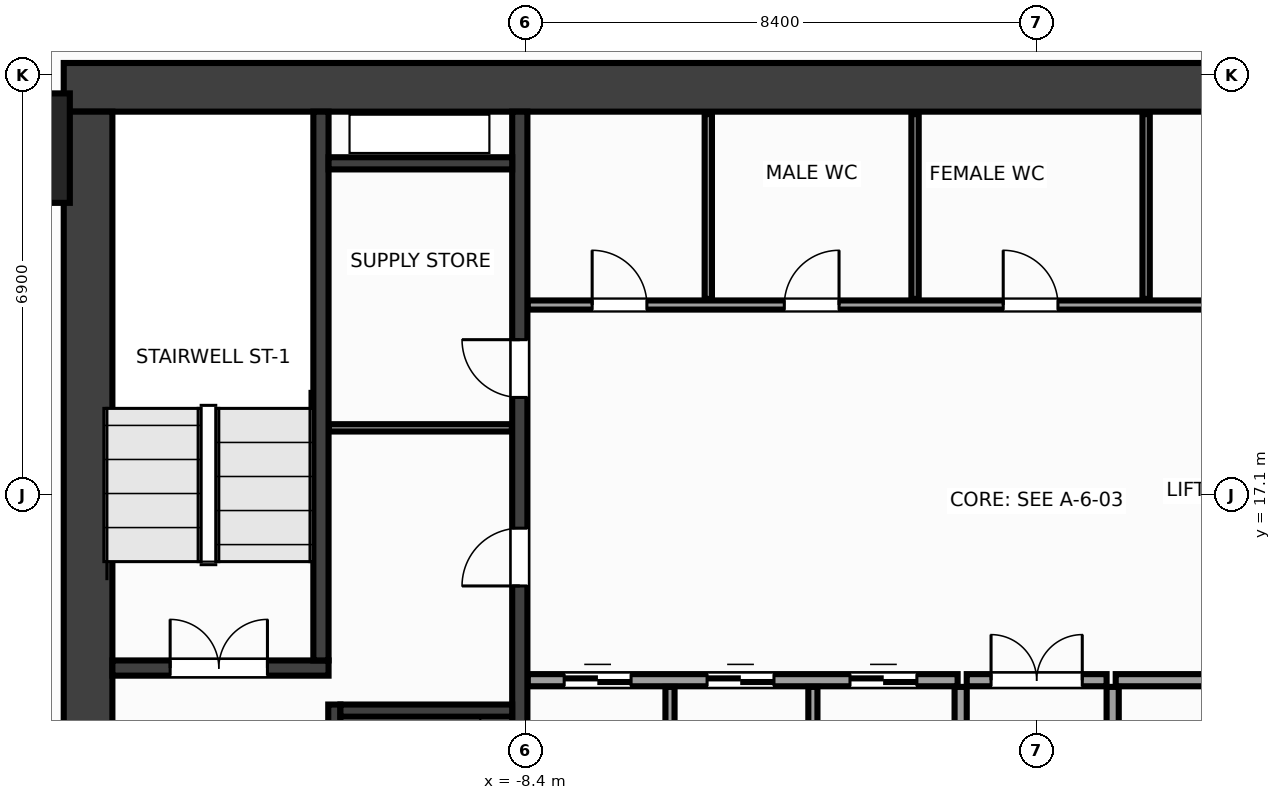
"""IFC4 building model, lengths in metres.
Left out: names, types, materials, properties, quantities, classifications, styles, units other than length and angle.
Written with IfcOpenShell. Run it as: python <this file> out.ifc"""

import sys

from ifc_helpers import new_model, si_unit, direction, frame, frame_2d, origin, origin_2d, place, context, subcontext, project, spatial, rectangle, extrude, source, transform, mapped, element, fill, save


model = new_model("IFC4")
c1 = context("Model", 3, precision=1e-05, world=origin(), true_north=direction((0.0, 1.0)))
c2 = subcontext(c1, "Body", "Model", "MODEL_VIEW")
j1 = project(units=[si_unit("LENGTHUNIT", "METRE"), si_unit("PLANEANGLEUNIT", "RADIAN")], contexts=[c1])
p1 = place(None, origin())
s1 = spatial("IfcSite", under=j1, at=p1, CompositionType="ELEMENT")
p2 = place(p1, origin())
s2 = spatial("IfcBuilding", under=s1, at=p2, CompositionType="ELEMENT")
p3 = place(p2, frame((0.0, 0.0, 38.0)))
s3 = spatial("IfcBuildingStorey", under=s2, at=p3, CompositionType="ELEMENT", Elevation=38.0)
m1 = source(origin(), c2, "Body", "SweptSolid", [
    extrude(rectangle(XDim=32.0, YDim=0.8, at=frame_2d((16.0, 0.0))), origin(), (0.0, 0.0, 1.0), 3.6),
])
p4 = place(p3, frame((-16.0, 23.8, 0.0), z_axis=(0.0, 0.0, 1.0), x_axis=(1.0, 0.0, 0.0)))
e1 = element("IfcWall", 1, at=p4, inside=s3, PredefinedType="SHEAR", context=c2, shape_type="MappedRepresentation", body=[
    mapped(m1, transform((0.0, 0.0, 0.0), x_axis=(1.0, 0.0, 0.0), y_axis=(0.0, 1.0, 0.0), z_axis=(0.0, 0.0, 1.0), scale=1.0)),
])
m2 = source(origin(), c2, "Body", "SweptSolid", [
    extrude(rectangle(XDim=12.8, YDim=0.8, at=frame_2d((6.4, 0.0))), origin(), (0.0, 0.0, 1.0), 3.6),
])
p5 = place(p3, frame((-15.6, 10.6, 0.0), z_axis=(0.0, 0.0, 1.0), x_axis=(0.0, 1.0, 0.0)))
e2 = element("IfcWall", 2, at=p5, inside=s3, PredefinedType="SHEAR", context=c2, shape_type="MappedRepresentation", body=[
    mapped(m2, transform((0.0, 0.0, 0.0), x_axis=(1.0, 0.0, 0.0), y_axis=(0.0, 1.0, 0.0), z_axis=(0.0, 0.0, 1.0), scale=1.0)),
])
m3 = source(origin(), c2, "Body", "SweptSolid", [
    extrude(rectangle(XDim=12.8, YDim=0.25, at=frame_2d((6.4, 0.0))), origin(), (0.0, 0.0, 1.0), 3.6),
])
p6 = place(p3, frame((-8.5, 10.6, 0.0), z_axis=(0.0, 0.0, 1.0), x_axis=(0.0, 1.0, 0.0)))
e3 = element("IfcWall", 3, at=p6, inside=s3, PredefinedType="SHEAR", context=c2, shape_type="MappedRepresentation", body=[
    mapped(m3, transform((0.0, 0.0, 0.0), x_axis=(1.0, 0.0, 0.0), y_axis=(0.0, 1.0, 0.0), z_axis=(0.0, 0.0, 1.0), scale=1.0)),
])
p7 = place(p6, frame((5.0, 0.0, 0.0)))
e4 = element("IfcOpeningElement", 4, at=p7, cuts=e3, PredefinedType="OPENING", context=c2, shape_type="SweptSolid", body=[
    extrude(rectangle(XDim=0.95, YDim=2.15, at=frame_2d((0.475, 1.075))), frame((0.0, 0.137, 0.0), z_axis=(0.0, -1.0, 0.0), x_axis=(1.0, 0.0, 0.0)), (0.0, 0.0, 1.0), 0.274),
])
p8 = place(p6, frame((8.1, 0.0, 0.0)))
e5 = element("IfcOpeningElement", 5, at=p8, cuts=e3, PredefinedType="OPENING", context=c2, shape_type="SweptSolid", body=[
    extrude(rectangle(XDim=0.95, YDim=2.15, at=frame_2d((0.475, 1.075))), frame((0.0, 0.137, 0.0), z_axis=(0.0, -1.0, 0.0), x_axis=(1.0, 0.0, 0.0)), (0.0, 0.0, 1.0), 0.274),
])
m4 = source(origin(), c2, "Body", "SweptSolid", [
    extrude(rectangle(XDim=3.555, YDim=0.25, at=frame_2d((1.777, 0.0))), origin(), (0.0, 0.0, 1.0), 3.6),
])
p9 = place(p3, frame((-15.2, 14.25, 0.0), z_axis=(0.0, 0.0, 1.0), x_axis=(1.0, 0.0, 0.0)))
e6 = element("IfcWall", 6, at=p9, inside=s3, PredefinedType="SHEAR", context=c2, shape_type="MappedRepresentation", body=[
    mapped(m4, transform((0.0, 0.0, 0.0), x_axis=(1.0, 0.0, 0.0), y_axis=(0.0, 1.0, 0.0), z_axis=(0.0, 0.0, 1.0), scale=1.0)),
])
p10 = place(p9, frame((0.95, 0.0, 0.0)))
e7 = element("IfcOpeningElement", 7, at=p10, cuts=e6, PredefinedType="OPENING", context=c2, shape_type="SweptSolid", body=[
    extrude(rectangle(XDim=1.6, YDim=2.15, at=frame_2d((0.8, 1.075))), frame((0.0, 0.137, 0.0), z_axis=(0.0, -1.0, 0.0), x_axis=(1.0, 0.0, 0.0)), (0.0, 0.0, 1.0), 0.274),
])
m5 = source(origin(), c2, "Body", "SweptSolid", [
    extrude(rectangle(XDim=9.025, YDim=0.25, at=frame_2d((4.512, 0.0))), origin(), (0.0, 0.0, 1.0), 3.6),
])
p11 = place(p3, frame((-11.77, 14.375, 0.0), z_axis=(0.0, 0.0, 1.0), x_axis=(0.0, 1.0, 0.0)))
e8 = element("IfcWall", 8, at=p11, inside=s3, PredefinedType="SHEAR", context=c2, shape_type="MappedRepresentation", body=[
    mapped(m5, transform((0.0, 0.0, 0.0), x_axis=(1.0, 0.0, 0.0), y_axis=(0.0, 1.0, 0.0), z_axis=(0.0, 0.0, 1.0), scale=1.0)),
])
m6 = source(origin(), c2, "Body", "SweptSolid", [
    extrude(rectangle(XDim=3.05, YDim=0.2, at=frame_2d((1.525, 0.0))), origin(), (0.0, 0.0, 1.0), 3.6),
])
p12 = place(p3, frame((-11.55, 10.6, 0.0), z_axis=(0.0, 0.0, 1.0), x_axis=(0.0, 1.0, 0.0)))
e9 = element("IfcWall", 9, at=p12, inside=s3, PredefinedType="SHEAR", context=c2, shape_type="MappedRepresentation", body=[
    mapped(m6, transform((0.0, 0.0, 0.0), x_axis=(1.0, 0.0, 0.0), y_axis=(0.0, 1.0, 0.0), z_axis=(0.0, 0.0, 1.0), scale=1.0)),
])
p13 = place(p12, frame((0.9, 0.0, 0.0)))
e10 = element("IfcOpeningElement", 10, at=p13, cuts=e9, PredefinedType="OPENING", context=c2, shape_type="SweptSolid", body=[
    extrude(rectangle(XDim=1.1, YDim=2.15, at=frame_2d((0.55, 1.075))), frame((0.0, 0.112, 0.0), z_axis=(0.0, -1.0, 0.0), x_axis=(1.0, 0.0, 0.0)), (0.0, 0.0, 1.0), 0.224),
])
m7 = source(origin(), c2, "Body", "SweptSolid", [
    extrude(rectangle(XDim=2.825, YDim=0.2, at=frame_2d((1.413, 0.0))), origin(), (0.0, 0.0, 1.0), 3.6),
])
p14 = place(p3, frame((-11.45, 13.55, 0.0), z_axis=(0.0, 0.0, 1.0), x_axis=(1.0, 0.0, 0.0)))
e11 = element("IfcWall", 11, at=p14, inside=s3, PredefinedType="SHEAR", context=c2, shape_type="MappedRepresentation", body=[
    mapped(m7, transform((0.0, 0.0, 0.0), x_axis=(1.0, 0.0, 0.0), y_axis=(0.0, 1.0, 0.0), z_axis=(0.0, 0.0, 1.0), scale=1.0)),
])
m8 = source(origin(), c2, "Body", "SweptSolid", [
    extrude(rectangle(XDim=3.02, YDim=0.2, at=frame_2d((1.51, 0.0))), origin(), (0.0, 0.0, 1.0), 3.6),
])
p15 = place(p3, frame((-11.645, 22.55, 0.0), z_axis=(0.0, 0.0, 1.0), x_axis=(1.0, 0.0, 0.0)))
e12 = element("IfcWall", 12, at=p15, inside=s3, PredefinedType="SHEAR", context=c2, shape_type="MappedRepresentation", body=[
    mapped(m8, transform((0.0, 0.0, 0.0), x_axis=(1.0, 0.0, 0.0), y_axis=(0.0, 1.0, 0.0), z_axis=(0.0, 0.0, 1.0), scale=1.0)),
])
m9 = source(origin(), c2, "Body", "SweptSolid", [
    extrude(rectangle(XDim=1.8, YDim=1.8, at=origin_2d()), origin(), (0.0, 0.0, 1.0), 3.6),
])
p16 = place(p3, frame((-16.8, 22.8, 0.0), z_axis=(0.0, 0.0, 1.0), x_axis=(1.0, 0.0, 0.0)))
e13 = element("IfcColumn", 13, at=p16, inside=s3, PredefinedType="COLUMN", context=c2, shape_type="MappedRepresentation", body=[
    mapped(m9, transform((0.0, 0.0, 0.0), x_axis=(1.0, 0.0, 0.0), y_axis=(0.0, 1.0, 0.0), z_axis=(0.0, 0.0, 1.0), scale=1.0)),
])
m10 = source(origin(), c2, "Body", "SweptSolid", [
    extrude(rectangle(XDim=3.01, YDim=0.12, at=frame_2d((1.505, 0.0))), origin(), (0.0, 0.0, 1.0), 3.36),
])
p17 = place(p3, frame((-11.64, 18.2, 0.0), z_axis=(0.0, 0.0, 1.0), x_axis=(1.0, 0.0, 0.0)))
e14 = element("IfcWall", 14, at=p17, inside=s3, PredefinedType="PARTITIONING", context=c2, shape_type="MappedRepresentation", body=[
    mapped(m10, transform((0.0, 0.0, 0.0), x_axis=(1.0, 0.0, 0.0), y_axis=(0.0, 1.0, 0.0), z_axis=(0.0, 0.0, 1.0), scale=1.0)),
])
m11 = source(origin(), c2, "Body", "SweptSolid", [
    extrude(rectangle(XDim=7.07, YDim=0.2, at=frame_2d((3.535, 0.0))), origin(), (0.0, 0.0, 1.0), 3.36),
])
p18 = place(p3, frame((-8.37, 14.05, 0.0), z_axis=(0.0, 0.0, 1.0), x_axis=(1.0, 0.0, 0.0)))
e15 = element("IfcWall", 15, at=p18, inside=s3, PredefinedType="PARTITIONING", context=c2, shape_type="MappedRepresentation", body=[
    mapped(m11, transform((0.0, 0.0, 0.0), x_axis=(1.0, 0.0, 0.0), y_axis=(0.0, 1.0, 0.0), z_axis=(0.0, 0.0, 1.0), scale=1.0)),
])
p19 = place(p18, frame((0.6, 0.0, 0.0)))
e16 = element("IfcOpeningElement", 16, at=p19, cuts=e15, PredefinedType="OPENING", context=c2, shape_type="SweptSolid", body=[
    extrude(rectangle(XDim=1.1, YDim=2.15, at=frame_2d((0.55, 1.075))), frame((0.0, 0.112, 0.0), z_axis=(0.0, -1.0, 0.0), x_axis=(1.0, 0.0, 0.0)), (0.0, 0.0, 1.0), 0.224),
])
p20 = place(p18, frame((2.95, 0.0, 0.0)))
e17 = element("IfcOpeningElement", 17, at=p20, cuts=e15, PredefinedType="OPENING", context=c2, shape_type="SweptSolid", body=[
    extrude(rectangle(XDim=1.1, YDim=2.15, at=frame_2d((0.55, 1.075))), frame((0.0, 0.112, 0.0), z_axis=(0.0, -1.0, 0.0), x_axis=(1.0, 0.0, 0.0)), (0.0, 0.0, 1.0), 0.224),
])
p21 = place(p18, frame((5.3, 0.0, 0.0)))
e18 = element("IfcOpeningElement", 18, at=p21, cuts=e15, PredefinedType="OPENING", context=c2, shape_type="SweptSolid", body=[
    extrude(rectangle(XDim=1.1, YDim=2.15, at=frame_2d((0.55, 1.075))), frame((0.0, 0.112, 0.0), z_axis=(0.0, -1.0, 0.0), x_axis=(1.0, 0.0, 0.0)), (0.0, 0.0, 1.0), 0.224),
])
p22 = place(p3, frame((1.3, 14.05, 0.0), z_axis=(0.0, 0.0, 1.0), x_axis=(1.0, 0.0, 0.0)))
e19 = element("IfcWall", 19, at=p22, inside=s3, PredefinedType="PARTITIONING", context=c2, shape_type="MappedRepresentation", body=[
    mapped(m11, transform((0.0, 0.0, 0.0), x_axis=(1.0, 0.0, 0.0), y_axis=(0.0, 1.0, 0.0), z_axis=(0.0, 0.0, 1.0), scale=1.0)),
])
m12 = source(origin(), c2, "Body", "SweptSolid", [
    extrude(rectangle(XDim=3.34, YDim=0.2, at=frame_2d((1.67, 0.0))), origin(), (0.0, 0.0, 1.0), 3.36),
])
for number, where, z_axis, x_axis in (
    (20, (-1.25, 10.6, 0.0), (0.0, 0.0, 1.0), (0.0, 1.0, 0.0)),
    (21, (1.25, 10.6, 0.0), (0.0, 0.0, 1.0), (0.0, 1.0, 0.0)),
):
    element("IfcWall", number, at=place(p3, frame(where, z_axis=z_axis, x_axis=x_axis)), inside=s3, PredefinedType="PARTITIONING", context=c2, shape_type="MappedRepresentation", body=[
        mapped(m12, transform((0.0, 0.0, 0.0), x_axis=(1.0, 0.0, 0.0), y_axis=(0.0, 1.0, 0.0), z_axis=(0.0, 0.0, 1.0), scale=1.0)),
    ])
m13 = source(origin(), c2, "Body", "SweptSolid", [
    extrude(rectangle(XDim=2.3, YDim=0.2, at=frame_2d((1.15, 0.0))), origin(), (0.0, 0.0, 1.0), 3.36),
])
p23 = place(p3, frame((-1.15, 14.05, 0.0), z_axis=(0.0, 0.0, 1.0), x_axis=(1.0, 0.0, 0.0)))
e22 = element("IfcWall", 22, at=p23, inside=s3, PredefinedType="PARTITIONING", context=c2, shape_type="MappedRepresentation", body=[
    mapped(m13, transform((0.0, 0.0, 0.0), x_axis=(1.0, 0.0, 0.0), y_axis=(0.0, 1.0, 0.0), z_axis=(0.0, 0.0, 1.0), scale=1.0)),
])
p24 = place(p23, frame((0.4, 0.0, 0.0)))
e23 = element("IfcOpeningElement", 23, at=p24, cuts=e22, PredefinedType="OPENING", context=c2, shape_type="SweptSolid", body=[
    extrude(rectangle(XDim=1.5, YDim=2.2, at=frame_2d((0.75, 1.1))), frame((0.0, 0.112, 0.0), z_axis=(0.0, -1.0, 0.0), x_axis=(1.0, 0.0, 0.0)), (0.0, 0.0, 1.0), 0.224),
])
m14 = source(origin(), c2, "Body", "SweptSolid", [
    extrude(rectangle(XDim=14.59, YDim=0.15, at=frame_2d((7.295, 0.0))), origin(), (0.0, 0.0, 1.0), 3.36),
])
p25 = place(p3, frame((-8.37, 20.22, 0.0), z_axis=(0.0, 0.0, 1.0), x_axis=(1.0, 0.0, 0.0)))
e24 = element("IfcWall", 24, at=p25, inside=s3, PredefinedType="PARTITIONING", context=c2, shape_type="MappedRepresentation", body=[
    mapped(m14, transform((0.0, 0.0, 0.0), x_axis=(1.0, 0.0, 0.0), y_axis=(0.0, 1.0, 0.0), z_axis=(0.0, 0.0, 1.0), scale=1.0)),
])
p26 = place(p25, frame((1.06, 0.0, 0.0)))
e25 = element("IfcOpeningElement", 25, at=p26, cuts=e24, PredefinedType="OPENING", context=c2, shape_type="SweptSolid", body=[
    extrude(rectangle(XDim=0.9, YDim=2.15, at=frame_2d((0.45, 1.075))), frame((0.0, 0.087, 0.0), z_axis=(0.0, -1.0, 0.0), x_axis=(1.0, 0.0, 0.0)), (0.0, 0.0, 1.0), 0.174),
])
p27 = place(p25, frame((4.22, 0.0, 0.0)))
e26 = element("IfcOpeningElement", 26, at=p27, cuts=e24, PredefinedType="OPENING", context=c2, shape_type="SweptSolid", body=[
    extrude(rectangle(XDim=0.9, YDim=2.15, at=frame_2d((0.45, 1.075))), frame((0.0, 0.087, 0.0), z_axis=(0.0, -1.0, 0.0), x_axis=(1.0, 0.0, 0.0)), (0.0, 0.0, 1.0), 0.174),
])
p28 = place(p25, frame((7.82, 0.0, 0.0)))
e27 = element("IfcOpeningElement", 27, at=p28, cuts=e24, PredefinedType="OPENING", context=c2, shape_type="SweptSolid", body=[
    extrude(rectangle(XDim=0.9, YDim=2.15, at=frame_2d((0.45, 1.075))), frame((0.0, 0.087, 0.0), z_axis=(0.0, -1.0, 0.0), x_axis=(1.0, 0.0, 0.0)), (0.0, 0.0, 1.0), 0.174),
])
p29 = place(p25, frame((11.87, 0.0, 0.0)))
e28 = element("IfcOpeningElement", 28, at=p29, cuts=e24, PredefinedType="OPENING", context=c2, shape_type="SweptSolid", body=[
    extrude(rectangle(XDim=0.9, YDim=2.15, at=frame_2d((0.45, 1.075))), frame((0.0, 0.087, 0.0), z_axis=(0.0, -1.0, 0.0), x_axis=(1.0, 0.0, 0.0)), (0.0, 0.0, 1.0), 0.174),
])
m15 = source(origin(), c2, "Body", "SweptSolid", [
    extrude(rectangle(XDim=3.34, YDim=0.15, at=frame_2d((1.67, 0.0))), origin(), (0.0, 0.0, 1.0), 3.36),
])
for number, where, z_axis, x_axis in (
    (29, (-6.03, 10.6, 0.0), (0.0, 0.0, 1.0), (0.0, 1.0, 0.0)),
    (30, (-3.68, 10.6, 0.0), (0.0, 0.0, 1.0), (0.0, 1.0, 0.0)),
):
    element("IfcWall", number, at=place(p3, frame(where, z_axis=z_axis, x_axis=x_axis)), inside=s3, PredefinedType="PARTITIONING", context=c2, shape_type="MappedRepresentation", body=[
        mapped(m15, transform((0.0, 0.0, 0.0), x_axis=(1.0, 0.0, 0.0), y_axis=(0.0, 1.0, 0.0), z_axis=(0.0, 0.0, 1.0), scale=1.0)),
    ])
m16 = source(origin(), c2, "Body", "SweptSolid", [
    extrude(rectangle(XDim=3.04, YDim=0.12, at=frame_2d((1.52, 0.0))), origin(), (0.0, 0.0, 1.0), 3.36),
])
for number, where, z_axis, x_axis in (
    (31, (-5.4, 20.32, 0.0), (0.0, 0.0, 1.0), (0.0, 1.0, 0.0)),
    (32, (-2.0, 20.32, 0.0), (0.0, 0.0, 1.0), (0.0, 1.0, 0.0)),
    (33, (1.8, 20.32, 0.0), (0.0, 0.0, 1.0), (0.0, 1.0, 0.0)),
):
    element("IfcWall", number, at=place(p3, frame(where, z_axis=z_axis, x_axis=x_axis)), inside=s3, PredefinedType="PARTITIONING", context=c2, shape_type="MappedRepresentation", body=[
        mapped(m16, transform((0.0, 0.0, 0.0), x_axis=(1.0, 0.0, 0.0), y_axis=(0.0, 1.0, 0.0), z_axis=(0.0, 0.0, 1.0), scale=1.0)),
    ])
m17 = source(origin(), c2, "Body", "SweptSolid", [
    extrude(rectangle(XDim=1.6, YDim=2.15, at=frame_2d((0.8, 1.075))), frame((0.0, 0.025, 0.0), z_axis=(0.0, -1.0, 0.0), x_axis=(1.0, 0.0, 0.0)), (0.0, 0.0, 1.0), 0.05),
])
p30 = place(p10, origin())
e34 = element("IfcDoor", 34, at=p30, inside=s3, OperationType="DOUBLE_DOOR_SINGLE_SWING", PredefinedType="DOOR", context=c2, shape_type="MappedRepresentation", body=[
    mapped(m17, transform((0.0, 0.0, 0.0), x_axis=(1.0, 0.0, 0.0), y_axis=(0.0, 1.0, 0.0), z_axis=(0.0, 0.0, 1.0), scale=1.0)),
])
fill(e7, e34)
m18 = source(origin(), c2, "Body", "SweptSolid", [
    extrude(rectangle(XDim=0.95, YDim=2.15, at=frame_2d((0.475, 1.075))), frame((0.0, 0.025, 0.0), z_axis=(0.0, -1.0, 0.0), x_axis=(1.0, 0.0, 0.0)), (0.0, 0.0, 1.0), 0.05),
])
p31 = place(p7, origin())
e35 = element("IfcDoor", 35, at=p31, inside=s3, OperationType="SINGLE_SWING_LEFT", PredefinedType="DOOR", context=c2, shape_type="MappedRepresentation", body=[
    mapped(m18, transform((0.0, 0.0, 0.0), x_axis=(1.0, 0.0, 0.0), y_axis=(0.0, 1.0, 0.0), z_axis=(0.0, 0.0, 1.0), scale=1.0)),
])
fill(e4, e35)
p32 = place(p8, origin())
e36 = element("IfcDoor", 36, at=p32, inside=s3, OperationType="SINGLE_SWING_RIGHT", PredefinedType="DOOR", context=c2, shape_type="MappedRepresentation", body=[
    mapped(m18, transform((0.0, 0.0, 0.0), x_axis=(1.0, 0.0, 0.0), y_axis=(0.0, 1.0, 0.0), z_axis=(0.0, 0.0, 1.0), scale=1.0)),
])
fill(e5, e36)
m19 = source(origin(), c2, "Body", "SweptSolid", [
    extrude(rectangle(XDim=1.1, YDim=2.15, at=frame_2d((0.55, 1.075))), frame((0.0, 0.025, 0.0), z_axis=(0.0, -1.0, 0.0), x_axis=(1.0, 0.0, 0.0)), (0.0, 0.0, 1.0), 0.05),
])
p33 = place(p19, origin())
e37 = element("IfcDoor", 37, at=p33, inside=s3, OperationType="DOUBLE_DOOR_SLIDING", PredefinedType="DOOR", context=c2, shape_type="MappedRepresentation", body=[
    mapped(m19, transform((0.0, 0.0, 0.0), x_axis=(1.0, 0.0, 0.0), y_axis=(0.0, 1.0, 0.0), z_axis=(0.0, 0.0, 1.0), scale=1.0)),
])
fill(e16, e37)
p34 = place(p20, origin())
e38 = element("IfcDoor", 38, at=p34, inside=s3, OperationType="DOUBLE_DOOR_SLIDING", PredefinedType="DOOR", context=c2, shape_type="MappedRepresentation", body=[
    mapped(m19, transform((0.0, 0.0, 0.0), x_axis=(1.0, 0.0, 0.0), y_axis=(0.0, 1.0, 0.0), z_axis=(0.0, 0.0, 1.0), scale=1.0)),
])
fill(e17, e38)
p35 = place(p21, origin())
e39 = element("IfcDoor", 39, at=p35, inside=s3, OperationType="DOUBLE_DOOR_SLIDING", PredefinedType="DOOR", context=c2, shape_type="MappedRepresentation", body=[
    mapped(m19, transform((0.0, 0.0, 0.0), x_axis=(1.0, 0.0, 0.0), y_axis=(0.0, 1.0, 0.0), z_axis=(0.0, 0.0, 1.0), scale=1.0)),
])
fill(e18, e39)
m20 = source(origin(), c2, "Body", "SweptSolid", [
    extrude(rectangle(XDim=1.5, YDim=2.2, at=frame_2d((0.75, 1.1))), frame((0.0, 0.025, 0.0), z_axis=(0.0, -1.0, 0.0), x_axis=(1.0, 0.0, 0.0)), (0.0, 0.0, 1.0), 0.05),
])
p36 = place(p24, origin())
e40 = element("IfcDoor", 40, at=p36, inside=s3, OperationType="DOUBLE_DOOR_SINGLE_SWING", PredefinedType="DOOR", context=c2, shape_type="MappedRepresentation", body=[
    mapped(m20, transform((0.0, 0.0, 0.0), x_axis=(1.0, 0.0, 0.0), y_axis=(0.0, 1.0, 0.0), z_axis=(0.0, 0.0, 1.0), scale=1.0)),
])
fill(e23, e40)
m21 = source(origin(), c2, "Body", "SweptSolid", [
    extrude(rectangle(XDim=0.9, YDim=2.15, at=frame_2d((0.45, 1.075))), frame((0.0, 0.025, 0.0), z_axis=(0.0, -1.0, 0.0), x_axis=(1.0, 0.0, 0.0)), (0.0, 0.0, 1.0), 0.05),
])
p37 = place(p26, origin())
e41 = element("IfcDoor", 41, at=p37, inside=s3, OperationType="SINGLE_SWING_LEFT", PredefinedType="DOOR", context=c2, shape_type="MappedRepresentation", body=[
    mapped(m21, transform((0.0, 0.0, 0.0), x_axis=(1.0, 0.0, 0.0), y_axis=(0.0, 1.0, 0.0), z_axis=(0.0, 0.0, 1.0), scale=1.0)),
])
fill(e25, e41)
p38 = place(p27, origin())
e42 = element("IfcDoor", 42, at=p38, inside=s3, OperationType="SINGLE_SWING_RIGHT", PredefinedType="DOOR", context=c2, shape_type="MappedRepresentation", body=[
    mapped(m21, transform((0.0, 0.0, 0.0), x_axis=(1.0, 0.0, 0.0), y_axis=(0.0, 1.0, 0.0), z_axis=(0.0, 0.0, 1.0), scale=1.0)),
])
fill(e26, e42)
p39 = place(p28, origin())
e43 = element("IfcDoor", 43, at=p39, inside=s3, OperationType="SINGLE_SWING_LEFT", PredefinedType="DOOR", context=c2, shape_type="MappedRepresentation", body=[
    mapped(m21, transform((0.0, 0.0, 0.0), x_axis=(1.0, 0.0, 0.0), y_axis=(0.0, 1.0, 0.0), z_axis=(0.0, 0.0, 1.0), scale=1.0)),
])
fill(e27, e43)
save(model, sys.argv[1])
